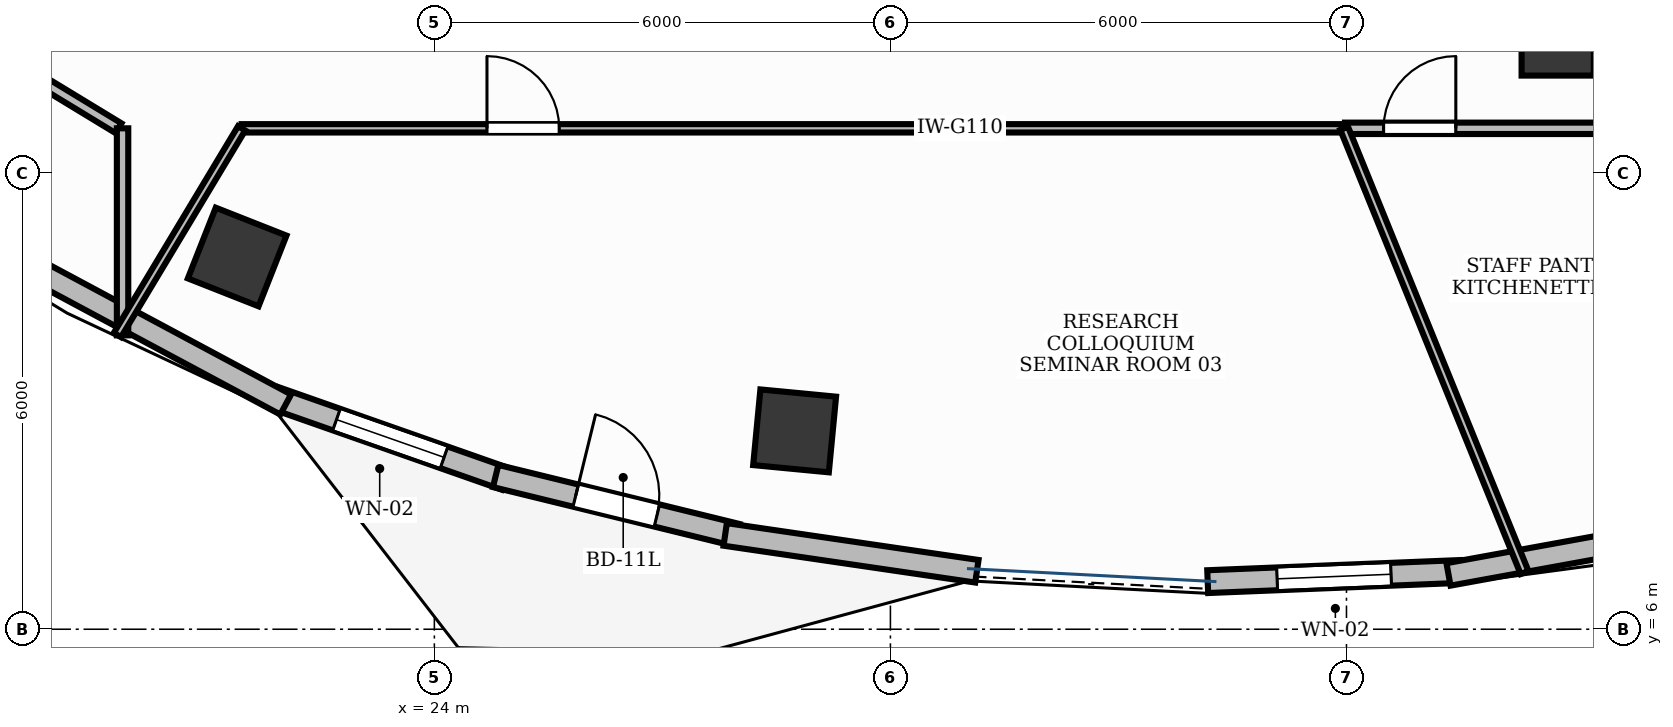
"""IFC4 building model, lengths in metres.
Left out: names, types, materials, properties, quantities, classifications, styles, units other than length and angle.
Written with IfcOpenShell. Run it as: python <this file> out.ifc"""

import sys

from ifc_helpers import new_model, si_unit, direction, frame, frame_2d, origin, origin_2d, place, context, subcontext, project, spatial, rectangle, extrude, element, fill, save


model = new_model("IFC4")
c1 = context("Model", 3, precision=1e-05, world=origin(), true_north=direction((0.0, 1.0)))
c2 = subcontext(c1, "Body", "Model", "MODEL_VIEW")
j1 = project(units=[si_unit("LENGTHUNIT", "METRE"), si_unit("PLANEANGLEUNIT", "RADIAN")], contexts=[c1])
p1 = place(None, origin())
s1 = spatial("IfcSite", under=j1, at=p1, CompositionType="ELEMENT")
p2 = place(p1, origin())
s2 = spatial("IfcBuilding", under=s1, at=p2, CompositionType="ELEMENT")
p3 = place(p2, frame((0.0, 0.0, 192.0)))
s3 = spatial("IfcBuildingStorey", under=s2, at=p3, CompositionType="ELEMENT", Elevation=192.0)
for number, where, z_axis, x_axis in (
    (1, (21.406, 10.897, -0.0), (0.0, 0.0, 1.0), (-0.93, 0.367, 0.0)),
    (2, (28.74, 8.61, -0.0), (0.0, 0.0, 1.0), (-0.995, 0.095, 0.0)),
):
    element("IfcColumn", number, at=place(p3, frame(where, z_axis=z_axis, x_axis=x_axis)), inside=s3, PredefinedType="COLUMN", context=c2, shape_type="SweptSolid", body=[
        extrude(rectangle(XDim=1.0, YDim=1.0, at=origin_2d()), origin(), (0.0, 0.0, 1.0), 3.901),
    ])
p4 = place(p3, frame((38.779, 13.759, -0.0), z_axis=(0.0, 0.0, 1.0), x_axis=(1.0, 0.0, 0.0)))
e3 = element("IfcColumn", 3, at=p4, inside=s3, PredefinedType="COLUMN", context=c2, shape_type="SweptSolid", body=[
    extrude(rectangle(XDim=0.95, YDim=0.95, at=origin_2d()), origin(), (0.0, 0.0, 1.0), 3.901),
])
p5 = place(p3, frame((21.904, 9.042, 0.0), z_axis=(0.0, 0.0, 1.0), x_axis=(0.943495444321, -0.331385495377, 0.0)))
e4 = element("IfcWall", 4, at=p5, inside=s3, PredefinedType="STANDARD", context=c2, shape_type="SweptSolid", body=[
    extrude(rectangle(XDim=3.214, YDim=0.3, at=frame_2d((1.607, 0.0))), origin(), (0.0, 0.0, 1.0), 3.47),
])
p6 = place(p5, frame((0.857, 0.0, 0.95)))
e5 = element("IfcOpeningElement", 5, at=p6, cuts=e4, PredefinedType="OPENING", context=c2, shape_type="SweptSolid", body=[
    extrude(rectangle(XDim=1.5, YDim=1.8, at=frame_2d((0.75, 0.9))), frame((0.0, 0.165, 0.0), z_axis=(0.0, -1.0, 0.0), x_axis=(1.0, 0.0, 0.0)), (0.0, 0.0, 1.0), 0.33),
])
p7 = place(p3, frame((24.807, 8.016, 0.0), z_axis=(0.0, 0.0, 1.0), x_axis=(0.971312804689, -0.237805457142, 0.0)))
e6 = element("IfcWall", 6, at=p7, inside=s3, PredefinedType="STANDARD", context=c2, shape_type="SweptSolid", body=[
    extrude(rectangle(XDim=3.269, YDim=0.3, at=frame_2d((1.634, 0.0))), origin(), (0.0, 0.0, 1.0), 3.9),
])
p8 = place(p7, frame((1.084, 0.0, 0.0)))
e7 = element("IfcOpeningElement", 7, at=p8, cuts=e6, PredefinedType="OPENING", context=c2, shape_type="SweptSolid", body=[
    extrude(rectangle(XDim=1.1, YDim=2.15, at=frame_2d((0.55, 1.075))), frame((0.0, 0.165, 0.0), z_axis=(0.0, -1.0, 0.0), x_axis=(1.0, 0.0, 0.0)), (0.0, 0.0, 1.0), 0.33),
])
p9 = place(p3, frame((34.174, 6.626, 0.0), z_axis=(0.0, 0.0, 1.0), x_axis=(0.999191674443, 0.040199474165, 0.0)))
e8 = element("IfcWall", 8, at=p9, inside=s3, PredefinedType="STANDARD", context=c2, shape_type="SweptSolid", body=[
    extrude(rectangle(XDim=3.328, YDim=0.3, at=frame_2d((1.664, 0.0))), origin(), (0.0, 0.0, 1.0), 3.9),
])
p10 = place(p9, frame((0.914, 0.0, 0.95)))
e9 = element("IfcOpeningElement", 9, at=p10, cuts=e8, PredefinedType="OPENING", context=c2, shape_type="SweptSolid", body=[
    extrude(rectangle(XDim=1.5, YDim=1.8, at=frame_2d((0.75, 0.9))), frame((0.0, 0.165, 0.0), z_axis=(0.0, -1.0, 0.0), x_axis=(1.0, 0.0, 0.0)), (0.0, 0.0, 1.0), 0.33),
])
p11 = place(p3, frame((16.647, 11.85, 0.0), z_axis=(0.0, 0.0, 1.0), x_axis=(0.881364369565, -0.472437136624, 0.0)))
e10 = element("IfcWall", 10, at=p11, inside=s3, PredefinedType="STANDARD", context=c2, shape_type="SweptSolid", body=[
    extrude(rectangle(XDim=6.124, YDim=0.3, at=frame_2d((3.062, 0.0))), origin(), (0.0, 0.0, 1.0), 3.47),
])
p12 = place(p3, frame((27.826, 7.247, 0.0), z_axis=(0.0, 0.0, 1.0), x_axis=(0.98945927954, -0.144811374319, 0.0)))
e11 = element("IfcWall", 11, at=p12, inside=s3, PredefinedType="STANDARD", context=c2, shape_type="SweptSolid", body=[
    extrude(rectangle(XDim=3.346, YDim=0.3, at=frame_2d((1.673, 0.0))), origin(), (0.0, 0.0, 1.0), 3.47),
])
p13 = place(p3, frame((37.342, 6.721, 0.0), z_axis=(0.0, 0.0, 1.0), x_axis=(0.983808533342, 0.179222681945, 0.0)))
e12 = element("IfcWall", 12, at=p13, inside=s3, PredefinedType="STANDARD", context=c2, shape_type="SweptSolid", body=[
    extrude(rectangle(XDim=6.498, YDim=0.3, at=frame_2d((3.249, 0.0))), origin(), (0.0, 0.0, 1.0), 3.9),
])
p14 = place(p3, frame((21.464, 12.59, 0.0), z_axis=(0.0, 0.0, 1.0), x_axis=(1.0, 0.0, 0.0)))
e13 = element("IfcWall", 13, at=p14, inside=s3, PredefinedType="MOVABLE", context=c2, shape_type="SweptSolid", body=[
    extrude(rectangle(XDim=14.505, YDim=0.11, at=frame_2d((7.252, 0.0))), origin(), (0.0, 0.0, 1.0), 2.91),
])
p15 = place(p14, frame((3.228, 0.0, 0.0)))
e14 = element("IfcOpeningElement", 14, at=p15, cuts=e13, PredefinedType="OPENING", context=c2, shape_type="SweptSolid", body=[
    extrude(rectangle(XDim=0.95, YDim=2.15, at=frame_2d((0.475, 1.075))), frame((0.0, 0.07, 0.0), z_axis=(0.0, -1.0, 0.0), x_axis=(1.0, 0.0, 0.0)), (0.0, 0.0, 1.0), 0.14),
])
p16 = place(p3, frame((35.98, 12.59, 0.0), z_axis=(0.0, 0.0, 1.0), x_axis=(1.0, 0.0, 0.0)))
e15 = element("IfcWall", 15, at=p16, inside=s3, PredefinedType="PARTITIONING", context=c2, shape_type="SweptSolid", body=[
    extrude(rectangle(XDim=4.368, YDim=0.15, at=frame_2d((2.184, 0.0))), origin(), (0.0, 0.0, 1.0), 2.91),
])
p17 = place(p16, frame((0.508, 0.0, 0.0)))
e16 = element("IfcOpeningElement", 16, at=p17, cuts=e15, PredefinedType="OPENING", context=c2, shape_type="SweptSolid", body=[
    extrude(rectangle(XDim=0.95, YDim=2.15, at=frame_2d((0.475, 1.075))), frame((0.0, 0.09, 0.0), z_axis=(0.0, -1.0, 0.0), x_axis=(1.0, 0.0, 0.0)), (0.0, 0.0, 1.0), 0.18),
])
p18 = place(p3, frame((18.031, 13.694, 0.0), z_axis=(0.0, 0.0, 1.0), x_axis=(0.85454497186, -0.51937740716, 0.0)))
e17 = element("IfcWall", 17, at=p18, inside=s3, PredefinedType="PARTITIONING", context=c2, shape_type="SweptSolid", body=[
    extrude(rectangle(XDim=2.122, YDim=0.15, at=frame_2d((1.061, 0.0))), origin(), (0.0, 0.0, 1.0), 2.91),
])
p19 = place(p3, frame((19.898, 12.59, 0.0), z_axis=(0.0, 0.0, 1.0), x_axis=(0.0, -1.0, 0.0)))
e18 = element("IfcWall", 18, at=p19, inside=s3, PredefinedType="PARTITIONING", context=c2, shape_type="SweptSolid", body=[
    extrude(rectangle(XDim=2.724, YDim=0.15, at=frame_2d((1.362, 0.0))), origin(), (0.0, 0.0, 1.0), 2.91),
])
p20 = place(p3, frame((19.831, 9.871, 0.0), z_axis=(0.0, 0.0, 1.0), x_axis=(0.51499369767, 0.857193963675, 0.0)))
e19 = element("IfcWall", 19, at=p20, inside=s3, PredefinedType="MOVABLE", context=c2, shape_type="SweptSolid", body=[
    extrude(rectangle(XDim=3.172, YDim=0.11, at=frame_2d((1.586, 0.0))), origin(), (0.0, 0.0, 1.0), 2.91),
])
p21 = place(p3, frame((35.969, 12.59, 0.0), z_axis=(0.0, 0.0, 1.0), x_axis=(0.376224407508, -0.92652857225, 0.0)))
e20 = element("IfcWall", 20, at=p21, inside=s3, PredefinedType="MOVABLE", context=c2, shape_type="SweptSolid", body=[
    extrude(rectangle(XDim=6.307, YDim=0.11, at=frame_2d((3.153, 0.0))), origin(), (0.0, 0.0, 1.0), 2.91),
])
p22 = place(p6, origin())
e21 = element("IfcWindow", 21, at=p22, inside=s3, PartitioningType="DOUBLE_PANEL_VERTICAL", PredefinedType="WINDOW", context=c2, shape_type="SweptSolid", body=[
    extrude(rectangle(XDim=1.5, YDim=1.8, at=frame_2d((0.75, 0.9))), frame((0.0, 0.03, 0.0), z_axis=(0.0, -1.0, 0.0), x_axis=(1.0, 0.0, 0.0)), (0.0, 0.0, 1.0), 0.06),
])
fill(e5, e21)
p23 = place(p8, origin())
e22 = element("IfcDoor", 22, at=p23, inside=s3, OperationType="SINGLE_SWING_LEFT", PredefinedType="DOOR", context=c2, shape_type="SweptSolid", body=[
    extrude(rectangle(XDim=1.1, YDim=2.15, at=frame_2d((0.55, 1.075))), frame((0.0, 0.025, 0.0), z_axis=(0.0, -1.0, 0.0), x_axis=(1.0, 0.0, 0.0)), (0.0, 0.0, 1.0), 0.05),
])
fill(e7, e22)
p24 = place(p10, origin())
e23 = element("IfcWindow", 23, at=p24, inside=s3, PartitioningType="DOUBLE_PANEL_VERTICAL", PredefinedType="WINDOW", context=c2, shape_type="SweptSolid", body=[
    extrude(rectangle(XDim=1.5, YDim=1.8, at=frame_2d((0.75, 0.9))), frame((0.0, 0.03, 0.0), z_axis=(0.0, -1.0, 0.0), x_axis=(1.0, 0.0, 0.0)), (0.0, 0.0, 1.0), 0.06),
])
fill(e9, e23)
p25 = place(p15, origin())
e24 = element("IfcDoor", 24, at=p25, inside=s3, OperationType="SINGLE_SWING_LEFT", PredefinedType="DOOR", context=c2, shape_type="SweptSolid", body=[
    extrude(rectangle(XDim=0.95, YDim=2.15, at=frame_2d((0.475, 1.075))), frame((0.0, 0.025, 0.0), z_axis=(0.0, -1.0, 0.0), x_axis=(1.0, 0.0, 0.0)), (0.0, 0.0, 1.0), 0.05),
])
fill(e14, e24)
p26 = place(p17, origin())
e25 = element("IfcDoor", 25, at=p26, inside=s3, OperationType="SINGLE_SWING_RIGHT", PredefinedType="DOOR", context=c2, shape_type="SweptSolid", body=[
    extrude(rectangle(XDim=0.95, YDim=2.15, at=frame_2d((0.475, 1.075))), frame((0.0, 0.025, 0.0), z_axis=(0.0, -1.0, 0.0), x_axis=(1.0, 0.0, 0.0)), (0.0, 0.0, 1.0), 0.05),
])
fill(e16, e25)
save(model, sys.argv[1])
